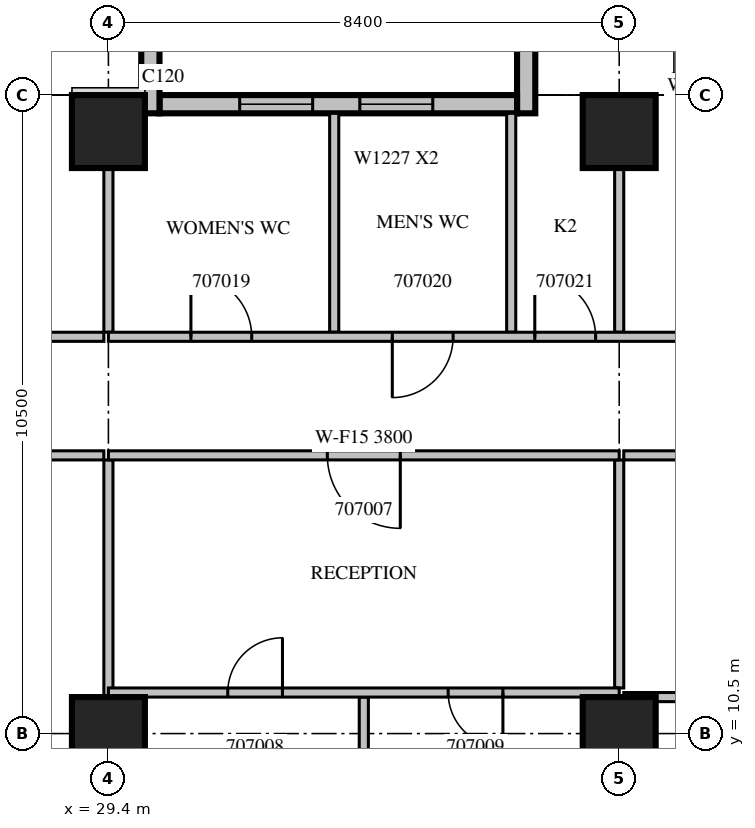
"""IFC4 building model, lengths in metres.
Left out: names, types, materials, properties, quantities, classifications, styles, units other than length and angle.
Written with IfcOpenShell. Run it as: python <this file> out.ifc"""

import sys

from ifc_helpers import new_model, si_unit, direction, frame, frame_2d, origin, origin_2d, place, context, subcontext, project, spatial, rectangle, extrude, source, transform, mapped, element, fill, save


model = new_model("IFC4")
c1 = context("Model", 3, precision=1e-05, world=origin(), true_north=direction((0.0, 1.0)))
c2 = subcontext(c1, "Body", "Model", "MODEL_VIEW")
j1 = project(units=[si_unit("LENGTHUNIT", "METRE"), si_unit("PLANEANGLEUNIT", "RADIAN")], contexts=[c1])
p1 = place(None, origin())
s1 = spatial("IfcSite", under=j1, at=p1, CompositionType="ELEMENT")
p2 = place(p1, origin())
s2 = spatial("IfcBuilding", under=s1, at=p2, CompositionType="ELEMENT")
p3 = place(p2, frame((0.0, 0.0, 40.5)))
s3 = spatial("IfcBuildingStorey", under=s2, at=p3, CompositionType="ELEMENT", Elevation=40.5)
m1 = source(origin(), c2, "Body", "SweptSolid", [
    extrude(rectangle(XDim=1.2, YDim=1.2, at=origin_2d()), origin(), (0.0, 0.0, 1.0), 4.2),
])
for number, where, z_axis, x_axis in (
    (1, (29.4, 10.5, 0.0), (0.0, 0.0, 1.0), (1.0, 0.0, 0.0)),
    (2, (37.8, 10.5, 0.0), (0.0, 0.0, 1.0), (1.0, 0.0, 0.0)),
    (3, (29.4, 20.4, 0.0), (0.0, 0.0, 1.0), (1.0, 0.0, 0.0)),
    (4, (37.8, 20.4, 0.0), (0.0, 0.0, 1.0), (1.0, 0.0, 0.0)),
):
    element("IfcColumn", number, at=place(p3, frame(where, z_axis=z_axis, x_axis=x_axis)), inside=s3, PredefinedType="COLUMN", context=c2, shape_type="MappedRepresentation", body=[
        mapped(m1, transform((0.0, 0.0, 0.0), scale=1.0)),
    ])
m2 = source(origin(), c2, "Body", "SweptSolid", [
    extrude(rectangle(XDim=1.2, YDim=0.3, at=frame_2d((0.6, 0.0))), origin(), (0.0, 0.0, 1.0), 3.8),
])
p4 = place(p3, frame((36.27, 20.7, 0.0), z_axis=(0.0, 0.0, 1.0), x_axis=(0.0, 1.0, 0.0)))
e5 = element("IfcWall", 5, at=p4, inside=s3, PredefinedType="STANDARD", context=c2, shape_type="MappedRepresentation", body=[
    mapped(m2, transform((0.0, 0.0, 0.0), scale=1.0)),
])
m3 = source(origin(), c2, "Body", "SweptSolid", [
    extrude(rectangle(XDim=5.88, YDim=0.3, at=frame_2d((2.94, 0.0))), origin(), (0.0, 0.0, 1.0), 3.8),
])
p5 = place(p3, frame((36.12, 20.85, 0.0), z_axis=(0.0, 0.0, 1.0), x_axis=(-1.0, 0.0, 0.0)))
e6 = element("IfcWall", 6, at=p5, inside=s3, PredefinedType="STANDARD", context=c2, shape_type="MappedRepresentation", body=[
    mapped(m3, transform((0.0, 0.0, 0.0), scale=1.0)),
])
m4 = source(origin(), c2, "Body", "SweptSolid", [
    extrude(rectangle(XDim=1.2, YDim=2.7, at=frame_2d((0.6, 1.35))), frame((0.0, 0.16, 0.0), z_axis=(0.0, -1.0, 0.0), x_axis=(1.0, 0.0, 0.0)), (0.0, 0.0, 1.0), 0.32),
])
p6 = place(p5, frame((1.386, 0.0, 0.6)))
e7 = element("IfcOpeningElement", 7, at=p6, cuts=e6, PredefinedType="OPENING", context=c2, shape_type="MappedRepresentation", body=[
    mapped(m4, transform((0.0, 0.0, 0.0), scale=1.0)),
])
p7 = place(p5, frame((3.361, 0.0, 0.6)))
e8 = element("IfcOpeningElement", 8, at=p7, cuts=e6, PredefinedType="OPENING", context=c2, shape_type="MappedRepresentation", body=[
    mapped(m4, transform((0.0, 0.0, 0.0), scale=1.0)),
])
p8 = place(p3, frame((30.09, 20.7, 0.0), z_axis=(0.0, 0.0, 1.0), x_axis=(0.0, 1.0, 0.0)))
e9 = element("IfcWall", 9, at=p8, inside=s3, PredefinedType="STANDARD", context=c2, shape_type="MappedRepresentation", body=[
    mapped(m2, transform((0.0, 0.0, 0.0), scale=1.0)),
])
m5 = source(origin(), c2, "Body", "SweptSolid", [
    extrude(rectangle(XDim=5.15, YDim=0.15, at=frame_2d((2.575, 0.0))), origin(), (0.0, 0.0, 1.0), 3.8),
])
for number, where, z_axis, x_axis in (
    (10, (29.325, 15.075, 0.0), (0.0, 0.0, 1.0), (-1.0, 0.0, 0.0)),
    (11, (24.175, 17.025, 0.0), (0.0, 0.0, 1.0), (1.0, 0.0, 0.0)),
):
    element("IfcWall", number, at=place(p3, frame(where, z_axis=z_axis, x_axis=x_axis)), inside=s3, PredefinedType="PARTITIONING", context=c2, shape_type="MappedRepresentation", body=[
        mapped(m5, transform((0.0, 0.0, 0.0), scale=1.0)),
    ])
p9 = place(p3, frame((29.4, 11.099, 0.0), z_axis=(0.0, 0.0, 1.0), x_axis=(0.0, 1.0, 0.0)))
e12 = element("IfcWall", 12, at=p9, inside=s3, PredefinedType="PARTITIONING", context=c2, shape_type="SweptSolid", body=[
    extrude(rectangle(XDim=3.901, YDim=0.15, at=frame_2d((1.95, 0.0))), origin(), (0.0, 0.0, 1.0), 3.8),
])
p10 = place(p3, frame((29.4, 17.1, 0.0), z_axis=(0.0, 0.0, 1.0), x_axis=(0.0, 1.0, 0.0)))
e13 = element("IfcWall", 13, at=p10, inside=s3, PredefinedType="PARTITIONING", context=c2, shape_type="SweptSolid", body=[
    extrude(rectangle(XDim=2.701, YDim=0.15, at=frame_2d((1.351, 0.0))), origin(), (0.0, 0.0, 1.0), 3.8),
])
p11 = place(p3, frame((37.875, 11.1, 0.0), z_axis=(0.0, 0.0, 1.0), x_axis=(1.0, 0.0, 0.0)))
e14 = element("IfcWall", 14, at=p11, inside=s3, PredefinedType="PARTITIONING", context=c2, shape_type="SweptSolid", body=[
    extrude(rectangle(XDim=6.45, YDim=0.15, at=frame_2d((3.225, 0.0))), origin(), (0.0, 0.0, 1.0), 3.8),
])
m6 = source(origin(), c2, "Body", "SweptSolid", [
    extrude(rectangle(XDim=6.45, YDim=0.15, at=frame_2d((3.225, 0.0))), origin(), (0.0, 0.0, 1.0), 3.8),
])
p12 = place(p3, frame((44.325, 15.075, 0.0), z_axis=(0.0, 0.0, 1.0), x_axis=(-1.0, 0.0, 0.0)))
e15 = element("IfcWall", 15, at=p12, inside=s3, PredefinedType="PARTITIONING", context=c2, shape_type="MappedRepresentation", body=[
    mapped(m6, transform((0.0, 0.0, 0.0), scale=1.0)),
])
m7 = source(origin(), c2, "Body", "SweptSolid", [
    extrude(rectangle(XDim=0.9, YDim=2.1, at=frame_2d((0.45, 1.05))), frame((0.0, 0.085, 0.0), z_axis=(0.0, -1.0, 0.0), x_axis=(1.0, 0.0, 0.0)), (0.0, 0.0, 1.0), 0.17),
])
p13 = place(p12, frame((2.812, 0.0, 0.0)))
e16 = element("IfcOpeningElement", 16, at=p13, cuts=e15, PredefinedType="OPENING", context=c2, shape_type="MappedRepresentation", body=[
    mapped(m7, transform((0.0, 0.0, 0.0), scale=1.0)),
])
p14 = place(p3, frame((33.6, 0.3, 0.0), z_axis=(0.0, 0.0, 1.0), x_axis=(0.0, 1.0, 0.0)))
e17 = element("IfcWall", 17, at=p14, inside=s3, PredefinedType="PARTITIONING", context=c2, shape_type="SweptSolid", body=[
    extrude(rectangle(XDim=10.8, YDim=0.15, at=frame_2d((5.4, 0.0))), origin(), (0.0, 0.0, 1.0), 3.8),
])
p15 = place(p3, frame((37.8, 11.25, 0.0), z_axis=(0.0, 0.0, 1.0), x_axis=(0.0, 1.0, 0.0)))
e18 = element("IfcWall", 18, at=p15, inside=s3, PredefinedType="PARTITIONING", context=c2, shape_type="SweptSolid", body=[
    extrude(rectangle(XDim=3.75, YDim=0.15, at=frame_2d((1.875, 0.0))), origin(), (0.0, 0.0, 1.0), 3.8),
])
p16 = place(p3, frame((37.8, 11.175, 0.0), z_axis=(0.0, 0.0, 1.0), x_axis=(-1.0, 0.0, 0.0)))
e19 = element("IfcWall", 19, at=p16, inside=s3, PredefinedType="PARTITIONING", context=c2, shape_type="SweptSolid", body=[
    extrude(rectangle(XDim=8.4, YDim=0.15, at=frame_2d((4.2, 0.0))), origin(), (0.0, 0.0, 1.0), 3.8),
])
p17 = place(p16, frame((5.537, 0.0, 0.0)))
e20 = element("IfcOpeningElement", 20, at=p17, cuts=e19, PredefinedType="OPENING", context=c2, shape_type="MappedRepresentation", body=[
    mapped(m7, transform((0.0, 0.0, 0.0), scale=1.0)),
])
p18 = place(p16, frame((1.913, 0.0, 0.0)))
e21 = element("IfcOpeningElement", 21, at=p18, cuts=e19, PredefinedType="OPENING", context=c2, shape_type="MappedRepresentation", body=[
    mapped(m7, transform((0.0, 0.0, 0.0), scale=1.0)),
])
m8 = source(origin(), c2, "Body", "SweptSolid", [
    extrude(rectangle(XDim=3.6, YDim=0.15, at=frame_2d((1.8, 0.0))), origin(), (0.0, 0.0, 1.0), 3.8),
])
for number, where, z_axis, x_axis in (
    (22, (33.113, 20.7, 0.0), (0.0, 0.0, 1.0), (0.0, -1.0, 0.0)),
    (23, (36.024, 20.7, 0.0), (0.0, 0.0, 1.0), (0.0, -1.0, 0.0)),
):
    element("IfcWall", number, at=place(p3, frame(where, z_axis=z_axis, x_axis=x_axis)), inside=s3, PredefinedType="PARTITIONING", context=c2, shape_type="MappedRepresentation", body=[
        mapped(m8, transform((0.0, 0.0, 0.0), scale=1.0)),
    ])
m9 = source(origin(), c2, "Body", "SweptSolid", [
    extrude(rectangle(XDim=2.701, YDim=0.15, at=frame_2d((1.351, 0.0))), origin(), (0.0, 0.0, 1.0), 3.8),
])
p19 = place(p3, frame((37.8, 17.1, 0.0), z_axis=(0.0, 0.0, 1.0), x_axis=(0.0, 1.0, 0.0)))
e24 = element("IfcWall", 24, at=p19, inside=s3, PredefinedType="PARTITIONING", context=c2, shape_type="MappedRepresentation", body=[
    mapped(m9, transform((0.0, 0.0, 0.0), scale=1.0)),
])
m10 = source(origin(), c2, "Body", "SweptSolid", [
    extrude(rectangle(XDim=8.4, YDim=0.15, at=frame_2d((4.2, 0.0))), origin(), (0.0, 0.0, 1.0), 3.8),
])
p20 = place(p3, frame((37.8, 15.075, 0.0), z_axis=(0.0, 0.0, 1.0), x_axis=(-1.0, 0.0, 0.0)))
e25 = element("IfcWall", 25, at=p20, inside=s3, PredefinedType="PARTITIONING", context=c2, shape_type="MappedRepresentation", body=[
    mapped(m10, transform((0.0, 0.0, 0.0), scale=1.0)),
])
p21 = place(p20, frame((3.6, 0.0, 0.0)))
e26 = element("IfcOpeningElement", 26, at=p21, cuts=e25, PredefinedType="OPENING", context=c2, shape_type="SweptSolid", body=[
    extrude(rectangle(XDim=1.2, YDim=2.1, at=frame_2d((0.6, 1.05))), frame((0.0, 0.085, 0.0), z_axis=(0.0, -1.0, 0.0), x_axis=(1.0, 0.0, 0.0)), (0.0, 0.0, 1.0), 0.17),
])
p22 = place(p3, frame((29.4, 17.025, 0.0), z_axis=(0.0, 0.0, 1.0), x_axis=(1.0, 0.0, 0.0)))
e27 = element("IfcWall", 27, at=p22, inside=s3, PredefinedType="PARTITIONING", context=c2, shape_type="SweptSolid", body=[
    extrude(rectangle(XDim=37.5, YDim=0.15, at=frame_2d((18.75, 0.0))), origin(), (0.0, 0.0, 1.0), 3.8),
])
m11 = source(origin(), c2, "Body", "SweptSolid", [
    extrude(rectangle(XDim=1.0, YDim=2.1, at=frame_2d((0.5, 1.05))), frame((0.0, 0.085, 0.0), z_axis=(0.0, -1.0, 0.0), x_axis=(1.0, 0.0, 0.0)), (0.0, 0.0, 1.0), 0.17),
])
p23 = place(p22, frame((1.357, 0.0, 0.0)))
e28 = element("IfcOpeningElement", 28, at=p23, cuts=e27, PredefinedType="OPENING", context=c2, shape_type="MappedRepresentation", body=[
    mapped(m11, transform((0.0, 0.0, 0.0), scale=1.0)),
])
p24 = place(p22, frame((4.669, 0.0, 0.0)))
e29 = element("IfcOpeningElement", 29, at=p24, cuts=e27, PredefinedType="OPENING", context=c2, shape_type="MappedRepresentation", body=[
    mapped(m11, transform((0.0, 0.0, 0.0), scale=1.0)),
])
p25 = place(p22, frame((7.012, 0.0, 0.0)))
e30 = element("IfcOpeningElement", 30, at=p25, cuts=e27, PredefinedType="OPENING", context=c2, shape_type="MappedRepresentation", body=[
    mapped(m11, transform((0.0, 0.0, 0.0), scale=1.0)),
])
m12 = source(origin(), c2, "Body", "SweptSolid", [
    extrude(rectangle(XDim=1.2, YDim=2.1, at=frame_2d((0.6, 1.05))), frame((0.0, 0.085, 0.0), z_axis=(0.0, -1.0, 0.0), x_axis=(1.0, 0.0, 0.0)), (0.0, 0.0, 1.0), 0.17),
])
p26 = place(p22, frame((12.0, 0.0, 0.0)))
e31 = element("IfcOpeningElement", 31, at=p26, cuts=e27, PredefinedType="OPENING", context=c2, shape_type="MappedRepresentation", body=[
    mapped(m12, transform((0.0, 0.0, 0.0), scale=1.0)),
])
p27 = place(p22, frame((19.24, 0.0, 0.0)))
e32 = element("IfcOpeningElement", 32, at=p27, cuts=e27, PredefinedType="OPENING", context=c2, shape_type="MappedRepresentation", body=[
    mapped(m11, transform((0.0, 0.0, 0.0), scale=1.0)),
])
p28 = place(p22, frame((25.17, 0.0, 0.0)))
e33 = element("IfcOpeningElement", 33, at=p28, cuts=e27, PredefinedType="OPENING", context=c2, shape_type="MappedRepresentation", body=[
    mapped(m7, transform((0.0, 0.0, 0.0), scale=1.0)),
])
p29 = place(p22, frame((30.052, 0.0, 0.0)))
e34 = element("IfcOpeningElement", 34, at=p29, cuts=e27, PredefinedType="OPENING", context=c2, shape_type="MappedRepresentation", body=[
    mapped(m11, transform((0.0, 0.0, 0.0), scale=1.0)),
])
p30 = place(p22, frame((33.608, 0.0, 0.0)))
e35 = element("IfcOpeningElement", 35, at=p30, cuts=e27, PredefinedType="OPENING", context=c2, shape_type="MappedRepresentation", body=[
    mapped(m11, transform((0.0, 0.0, 0.0), scale=1.0)),
])
p31 = place(p22, frame((36.124, 0.0, 0.0)))
e36 = element("IfcOpeningElement", 36, at=p31, cuts=e27, PredefinedType="OPENING", context=c2, shape_type="MappedRepresentation", body=[
    mapped(m11, transform((0.0, 0.0, 0.0), scale=1.0)),
])
m13 = source(origin(), c2, "Body", "SweptSolid", [
    extrude(rectangle(XDim=1.2, YDim=2.7, at=frame_2d((0.6, 1.35))), frame((0.0, 0.03, 0.0), z_axis=(0.0, -1.0, 0.0), x_axis=(1.0, 0.0, 0.0)), (0.0, 0.0, 1.0), 0.06),
])
p32 = place(p6, origin())
e37 = element("IfcWindow", 37, at=p32, inside=s3, PartitioningType="SINGLE_PANEL", PredefinedType="WINDOW", context=c2, shape_type="MappedRepresentation", body=[
    mapped(m13, transform((0.0, 0.0, 0.0), scale=1.0)),
])
fill(e7, e37)
p33 = place(p7, origin())
e38 = element("IfcWindow", 38, at=p33, inside=s3, PartitioningType="SINGLE_PANEL", PredefinedType="WINDOW", context=c2, shape_type="MappedRepresentation", body=[
    mapped(m13, transform((0.0, 0.0, 0.0), scale=1.0)),
])
fill(e8, e38)
m14 = source(origin(), c2, "Body", "SweptSolid", [
    extrude(rectangle(XDim=1.2, YDim=2.1, at=frame_2d((0.6, 1.05))), frame((0.0, 0.025, 0.0), z_axis=(0.0, -1.0, 0.0), x_axis=(1.0, 0.0, 0.0)), (0.0, 0.0, 1.0), 0.05),
])
p34 = place(p21, origin())
e39 = element("IfcDoor", 39, at=p34, inside=s3, OperationType="SINGLE_SWING_LEFT", PredefinedType="DOOR", context=c2, shape_type="MappedRepresentation", body=[
    mapped(m14, transform((0.0, 0.0, 0.0), scale=1.0)),
])
fill(e26, e39)
m15 = source(origin(), c2, "Body", "SweptSolid", [
    extrude(rectangle(XDim=0.9, YDim=2.1, at=frame_2d((0.45, 1.05))), frame((0.0, 0.025, 0.0), z_axis=(0.0, -1.0, 0.0), x_axis=(1.0, 0.0, 0.0)), (0.0, 0.0, 1.0), 0.05),
])
p35 = place(p17, origin())
e40 = element("IfcDoor", 40, at=p35, inside=s3, OperationType="SINGLE_SWING_RIGHT", PredefinedType="DOOR", context=c2, shape_type="MappedRepresentation", body=[
    mapped(m15, transform((0.0, 0.0, 0.0), scale=1.0)),
])
fill(e20, e40)
p36 = place(p18, origin())
e41 = element("IfcDoor", 41, at=p36, inside=s3, OperationType="SINGLE_SWING_LEFT", PredefinedType="DOOR", context=c2, shape_type="MappedRepresentation", body=[
    mapped(m15, transform((0.0, 0.0, 0.0), scale=1.0)),
])
fill(e21, e41)
m16 = source(origin(), c2, "Body", "SweptSolid", [
    extrude(rectangle(XDim=1.0, YDim=2.1, at=frame_2d((0.5, 1.05))), frame((0.0, 0.025, 0.0), z_axis=(0.0, -1.0, 0.0), x_axis=(1.0, 0.0, 0.0)), (0.0, 0.0, 1.0), 0.05),
])
p37 = place(p23, origin())
e42 = element("IfcDoor", 42, at=p37, inside=s3, OperationType="SINGLE_SWING_LEFT", PredefinedType="DOOR", context=c2, shape_type="MappedRepresentation", body=[
    mapped(m16, transform((0.0, 0.0, 0.0), scale=1.0)),
])
fill(e28, e42)
p38 = place(p24, origin())
e43 = element("IfcDoor", 43, at=p38, inside=s3, OperationType="SINGLE_SWING_RIGHT", PredefinedType="DOOR", context=c2, shape_type="MappedRepresentation", body=[
    mapped(m16, transform((0.0, 0.0, 0.0), scale=1.0)),
])
fill(e29, e43)
p39 = place(p25, origin())
e44 = element("IfcDoor", 44, at=p39, inside=s3, OperationType="SINGLE_SWING_LEFT", PredefinedType="DOOR", context=c2, shape_type="MappedRepresentation", body=[
    mapped(m16, transform((0.0, 0.0, 0.0), scale=1.0)),
])
fill(e30, e44)
save(model, sys.argv[1])
